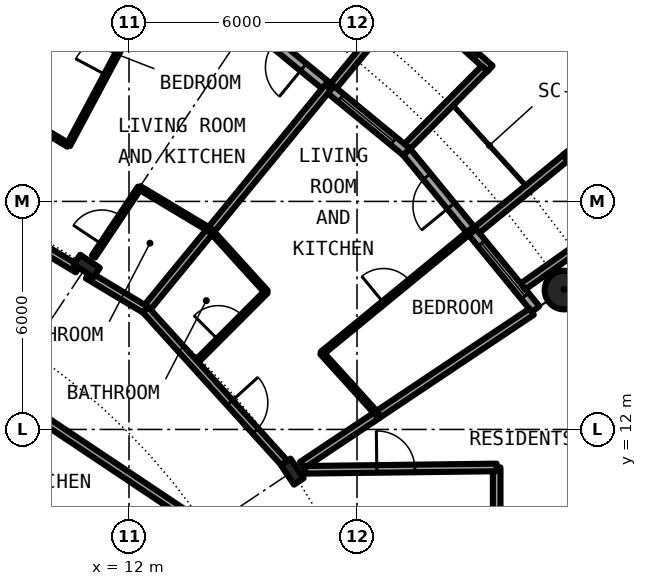
"""IFC4 building model, lengths in metres.
Left out: names, types, materials, properties, quantities, classifications, styles, units other than length and angle.
Written with IfcOpenShell. Run it as: python <this file> out.ifc"""

import sys

from ifc_helpers import new_model, si_unit, direction, frame, frame_2d, origin, origin_2d, place, context, subcontext, project, spatial, rectangle, circle, hollow_circle, i_section, extrude, element, fill, save


model = new_model("IFC4")
c1 = context("Model", 3, precision=1e-05, world=origin(), true_north=direction((0.0, 1.0)))
c2 = subcontext(c1, "Body", "Model", "MODEL_VIEW")
j1 = project(units=[si_unit("LENGTHUNIT", "METRE"), si_unit("PLANEANGLEUNIT", "RADIAN")], contexts=[c1])
p1 = place(None, origin())
s1 = spatial("IfcSite", under=j1, at=p1, CompositionType="ELEMENT")
p2 = place(p1, origin())
s2 = spatial("IfcBuilding", under=s1, at=p2, CompositionType="ELEMENT")
p3 = place(p2, frame((0.0, 0.0, 28.9)))
s3 = spatial("IfcBuildingStorey", under=s2, at=p3, CompositionType="ELEMENT", Elevation=28.9)
p4 = place(p3, frame((23.448, 15.667, 0.0), z_axis=(0.0, 0.0, 1.0), x_axis=(1.0, 0.0, 0.0)))
e1 = element("IfcColumn", 1, at=p4, inside=s3, PredefinedType="COLUMN", context=c2, shape_type="SweptSolid", body=[
    extrude(hollow_circle(Radius=0.508, WallThickness=0.05, at=origin_2d()), origin(), (0.0, 0.0, 1.0), 3.05),
])
for number, where, z_axis, x_axis in (
    (2, (16.297, 10.889, 0.0), (0.0, 0.0, 1.0), (0.831, 0.556, 0.0)),
    (3, (10.889, 16.297, 0.0), (0.0, 0.0, 1.0), (0.556, 0.831, 0.0)),
):
    element("IfcColumn", number, at=place(p3, frame(where, z_axis=z_axis, x_axis=x_axis)), inside=s3, PredefinedType="COLUMN", context=c2, shape_type="SweptSolid", body=[
        extrude(i_section(OverallWidth=0.305, OverallDepth=0.62, WebThickness=0.021, FlangeThickness=0.04, FilletRadius=0.027, at=origin_2d()), origin(), (0.0, 0.0, 1.0), 3.05),
    ])
p5 = place(p3, frame((22.699, 15.167, 0.0), z_axis=(0.0, 0.0, 1.0), x_axis=(-0.634382322723, 0.773019449054, 0.0)))
e4 = element("IfcWall", 4, at=p5, inside=s3, PredefinedType="SOLIDWALL", context=c2, shape_type="SweptSolid", body=[
    extrude(rectangle(XDim=5.352, YDim=0.25, at=frame_2d((2.676, 0.0))), origin(), (0.0, 0.0, 1.0), 2.7),
])
p6 = place(p5, frame((0.441, 0.0, 0.3)))
e5 = element("IfcOpeningElement", 5, at=p6, cuts=e4, PredefinedType="OPENING", context=c2, shape_type="SweptSolid", body=[
    extrude(rectangle(XDim=1.8, YDim=2.1, at=frame_2d((0.9, 1.05))), frame((0.0, 0.135, 0.0), z_axis=(0.0, -1.0, 0.0), x_axis=(1.0, 0.0, 0.0)), (0.0, 0.0, 1.0), 0.27),
])
p7 = place(p5, frame((3.51, 0.0, 0.0)))
e6 = element("IfcOpeningElement", 6, at=p7, cuts=e4, PredefinedType="OPENING", context=c2, shape_type="SweptSolid", body=[
    extrude(rectangle(XDim=1.0, YDim=2.2, at=frame_2d((0.5, 1.1))), frame((0.0, 0.135, 0.0), z_axis=(0.0, -1.0, 0.0), x_axis=(1.0, 0.0, 0.0)), (0.0, 0.0, 1.0), 0.27),
])
p8 = place(p3, frame((24.909, 17.427, -0.03), z_axis=(0.0, 0.0, 1.0), x_axis=(-0.60418752353, 0.796842165306, 0.0)))
e7 = element("IfcWall", 7, at=p8, inside=s3, PredefinedType="SOLIDWALL", context=c2, shape_type="SweptSolid", body=[
    extrude(rectangle(XDim=2.337, YDim=0.2, at=frame_2d((1.168, 0.0))), origin(), (0.0, 0.0, 1.0), 2.73),
])
p9 = place(p8, frame((0.128, 0.0, 0.33)))
e8 = element("IfcOpeningElement", 8, at=p9, cuts=e7, PredefinedType="OPENING", context=c2, shape_type="SweptSolid", body=[
    extrude(circle(Radius=1.04, at=frame_2d((1.04, 1.04))), frame((0.0, 0.11, 0.0), z_axis=(0.0, -1.0, 0.0), x_axis=(1.0, 0.0, 0.0)), (0.0, 0.0, 1.0), 0.22),
])
p10 = place(p3, frame((22.37, 15.765, -0.03), z_axis=(0.0, 0.0, 1.0), x_axis=(0.817256123454, 0.576274612209, 0.0)))
e9 = element("IfcWall", 9, at=p10, inside=s3, PredefinedType="SOLIDWALL", context=c2, shape_type="SweptSolid", body=[
    extrude(rectangle(XDim=2.933, YDim=0.2, at=frame_2d((1.466, 0.0))), origin(), (0.0, 0.0, 1.0), 2.73),
])
p11 = place(p3, frame((21.155, 17.246, -0.03), z_axis=(0.0, 0.0, 1.0), x_axis=(0.775179004516, 0.631741648902, 0.0)))
e10 = element("IfcWall", 10, at=p11, inside=s3, PredefinedType="SOLIDWALL", context=c2, shape_type="SweptSolid", body=[
    extrude(rectangle(XDim=3.006, YDim=0.2, at=frame_2d((1.503, 0.0))), origin(), (0.0, 0.0, 1.0), 2.73),
])
p12 = place(p3, frame((19.304, 19.304, 0.0), z_axis=(0.0, 0.0, 1.0), x_axis=(-0.773019449054, 0.634382322723, 0.0)))
e11 = element("IfcWall", 11, at=p12, inside=s3, PredefinedType="SOLIDWALL", context=c2, shape_type="SweptSolid", body=[
    extrude(rectangle(XDim=5.352, YDim=0.25, at=frame_2d((2.676, 0.0))), origin(), (0.0, 0.0, 1.0), 2.7),
])
p13 = place(p12, frame((0.441, 0.0, 0.3)))
e12 = element("IfcOpeningElement", 12, at=p13, cuts=e11, PredefinedType="OPENING", context=c2, shape_type="SweptSolid", body=[
    extrude(rectangle(XDim=1.8, YDim=2.1, at=frame_2d((0.9, 1.05))), frame((0.0, 0.135, 0.0), z_axis=(0.0, -1.0, 0.0), x_axis=(1.0, 0.0, 0.0)), (0.0, 0.0, 1.0), 0.27),
])
p14 = place(p12, frame((3.51, 0.0, 0.0)))
e13 = element("IfcOpeningElement", 13, at=p14, cuts=e11, PredefinedType="OPENING", context=c2, shape_type="SweptSolid", body=[
    extrude(rectangle(XDim=1.0, YDim=2.2, at=frame_2d((0.5, 1.1))), frame((0.0, 0.135, 0.0), z_axis=(0.0, -1.0, 0.0), x_axis=(1.0, 0.0, 0.0)), (0.0, 0.0, 1.0), 0.27),
])
p15 = place(p3, frame((21.5, 21.493, -0.03), z_axis=(0.0, 0.0, 1.0), x_axis=(-0.740998365753, 0.671506829416, 0.0)))
e14 = element("IfcWall", 14, at=p15, inside=s3, PredefinedType="SOLIDWALL", context=c2, shape_type="SweptSolid", body=[
    extrude(rectangle(XDim=2.993, YDim=0.2, at=frame_2d((1.497, 0.0))), origin(), (0.0, 0.0, 1.0), 2.73),
])
p16 = place(p15, frame((0.457, 0.0, 0.33)))
e15 = element("IfcOpeningElement", 15, at=p16, cuts=e14, PredefinedType="OPENING", context=c2, shape_type="SweptSolid", body=[
    extrude(circle(Radius=1.04, at=frame_2d((1.04, 1.04))), frame((0.0, 0.11, 0.0), z_axis=(0.0, -1.0, 0.0), x_axis=(1.0, 0.0, 0.0)), (0.0, 0.0, 1.0), 0.22),
])
p17 = place(p3, frame((19.323, 19.45, -0.03), z_axis=(0.0, 0.0, 1.0), x_axis=(0.704476739375, 0.709727076896, 0.0)))
e16 = element("IfcWall", 16, at=p17, inside=s3, PredefinedType="SOLIDWALL", context=c2, shape_type="SweptSolid", body=[
    extrude(rectangle(XDim=2.883, YDim=0.2, at=frame_2d((1.441, 0.0))), origin(), (0.0, 0.0, 1.0), 2.73),
])
p18 = place(p3, frame((17.384, 21.041, -0.03), z_axis=(0.0, 0.0, 1.0), x_axis=(0.63709551667, 0.770784861449, 0.0)))
e17 = element("IfcWall", 17, at=p18, inside=s3, PredefinedType="SOLIDWALL", context=c2, shape_type="SweptSolid", body=[
    extrude(rectangle(XDim=3.006, YDim=0.2, at=frame_2d((1.503, 0.0))), origin(), (0.0, 0.0, 1.0), 2.73),
])
p19 = place(p3, frame((21.675, 9.4, 0.0), z_axis=(0.0, 0.0, 1.0), x_axis=(0.0, 1.0, 0.0)))
e18 = element("IfcWall", 18, at=p19, inside=s3, PredefinedType="PARTITIONING", context=c2, shape_type="SweptSolid", body=[
    extrude(rectangle(XDim=1.6, YDim=0.2, at=frame_2d((0.8, 0.0))), origin(), (0.0, 0.0, 1.0), 2.7),
])
p20 = place(p3, frame((7.501, 18.108, 0.0), z_axis=(0.0, 0.0, 1.0), x_axis=(0.382490346157, 0.923959487801, 0.0)))
e19 = element("IfcWall", 19, at=p20, inside=s3, PredefinedType="PARTITIONING", context=c2, shape_type="SweptSolid", body=[
    extrude(rectangle(XDim=7.574, YDim=0.2, at=frame_2d((3.787, 0.0))), origin(), (0.0, 0.0, 1.0), 2.7),
])
p21 = place(p3, frame((10.405, 19.481, 0.0), z_axis=(0.0, 0.0, 1.0), x_axis=(0.471170755767, 0.882042016522, 0.0)))
e20 = element("IfcWall", 20, at=p21, inside=s3, PredefinedType="PARTITIONING", context=c2, shape_type="SweptSolid", body=[
    extrude(rectangle(XDim=5.089, YDim=0.1, at=frame_2d((2.545, 0.0))), origin(), (0.0, 0.0, 1.0), 2.7),
])
p22 = place(p21, frame((2.095, 0.0, 0.0)))
e21 = element("IfcOpeningElement", 21, at=p22, cuts=e20, PredefinedType="OPENING", context=c2, shape_type="SweptSolid", body=[
    extrude(rectangle(XDim=0.9, YDim=2.3, at=frame_2d((0.45, 1.15))), frame((0.0, 0.06, 0.0), z_axis=(0.0, -1.0, 0.0), x_axis=(1.0, 0.0, 0.0)), (0.0, 0.0, 1.0), 0.12),
])
p23 = place(p3, frame((11.067, 16.551, 0.0), z_axis=(0.0, 0.0, 1.0), x_axis=(0.55563200073, 0.831428337119, 0.0)))
e22 = element("IfcWall", 22, at=p23, inside=s3, PredefinedType="PARTITIONING", context=c2, shape_type="SweptSolid", body=[
    extrude(rectangle(XDim=2.176, YDim=0.1, at=frame_2d((1.088, 0.0))), origin(), (0.0, 0.0, 1.0), 2.7),
])
p24 = place(p23, frame((0.389, 0.0, 0.0)))
e23 = element("IfcOpeningElement", 23, at=p24, cuts=e22, PredefinedType="OPENING", context=c2, shape_type="SweptSolid", body=[
    extrude(rectangle(XDim=0.9, YDim=2.3, at=frame_2d((0.45, 1.15))), frame((0.0, 0.06, 0.0), z_axis=(0.0, -1.0, 0.0), x_axis=(1.0, 0.0, 0.0)), (0.0, 0.0, 1.0), 0.12),
])
p25 = place(p3, frame((12.434, 15.151, 0.0), z_axis=(0.0, 0.0, 1.0), x_axis=(0.634381303318, 0.773020285633, 0.0)))
e24 = element("IfcWall", 24, at=p25, inside=s3, PredefinedType="PARTITIONING", context=c2, shape_type="SweptSolid", body=[
    extrude(rectangle(XDim=7.576, YDim=0.2, at=frame_2d((3.788, 0.0))), origin(), (0.0, 0.0, 1.0), 2.7),
])
p26 = place(p3, frame((13.722, 13.73, 0.0), z_axis=(0.0, 0.0, 1.0), x_axis=(0.706741540154, 0.707471833659, 0.0)))
e25 = element("IfcWall", 25, at=p26, inside=s3, PredefinedType="PARTITIONING", context=c2, shape_type="SweptSolid", body=[
    extrude(rectangle(XDim=2.674, YDim=0.1, at=frame_2d((1.337, 0.0))), origin(), (0.0, 0.0, 1.0), 2.7),
])
p27 = place(p26, frame((0.887, 0.0, 0.0)))
e26 = element("IfcOpeningElement", 26, at=p27, cuts=e25, PredefinedType="OPENING", context=c2, shape_type="SweptSolid", body=[
    extrude(rectangle(XDim=0.9, YDim=2.3, at=frame_2d((0.45, 1.15))), frame((0.0, 0.06, 0.0), z_axis=(0.0, -1.0, 0.0), x_axis=(1.0, 0.0, 0.0)), (0.0, 0.0, 1.0), 0.12),
])
p28 = place(p3, frame((17.077, 14.006, 0.0), z_axis=(0.0, 0.0, 1.0), x_axis=(0.77326214499, 0.634086472908, 0.0)))
e27 = element("IfcWall", 27, at=p28, inside=s3, PredefinedType="PARTITIONING", context=c2, shape_type="SweptSolid", body=[
    extrude(rectangle(XDim=5.089, YDim=0.1, at=frame_2d((2.544, 0.0))), origin(), (0.0, 0.0, 1.0), 2.7),
])
p29 = place(p28, frame((2.094, 0.0, 0.0)))
e28 = element("IfcOpeningElement", 28, at=p29, cuts=e27, PredefinedType="OPENING", context=c2, shape_type="SweptSolid", body=[
    extrude(rectangle(XDim=0.9, YDim=2.3, at=frame_2d((0.45, 1.15))), frame((0.0, 0.06, 0.0), z_axis=(0.0, -1.0, 0.0), x_axis=(1.0, 0.0, 0.0)), (0.0, 0.0, 1.0), 0.12),
])
p30 = place(p3, frame((18.542, 12.389, 0.0), z_axis=(0.0, 0.0, 1.0), x_axis=(0.831387096605, 0.55569370664, 0.0)))
e29 = element("IfcWall", 29, at=p30, inside=s3, PredefinedType="PARTITIONING", context=c2, shape_type="SweptSolid", body=[
    extrude(rectangle(XDim=4.875, YDim=0.2, at=frame_2d((2.438, 0.0))), origin(), (0.0, 0.0, 1.0), 2.7),
])
p31 = place(p3, frame((16.555, 11.061, 0.0), z_axis=(0.0, 0.0, 1.0), x_axis=(0.832066006555, 0.554676627176, 0.0)))
e30 = element("IfcWall", 30, at=p31, inside=s3, PredefinedType="PARTITIONING", context=c2, shape_type="SweptSolid", body=[
    extrude(rectangle(XDim=2.39, YDim=0.2, at=frame_2d((1.195, 0.0))), origin(), (0.0, 0.0, 1.0), 2.7),
])
p32 = place(p3, frame((16.637, 10.938, 0.0), z_axis=(0.0, 0.0, 1.0), x_axis=(0.99992425795, 0.012307654658, 0.0)))
e31 = element("IfcWall", 31, at=p32, inside=s3, PredefinedType="PARTITIONING", context=c2, shape_type="SweptSolid", body=[
    extrude(rectangle(XDim=5.039, YDim=0.2, at=frame_2d((2.519, 0.0))), origin(), (0.0, 0.0, 1.0), 2.7),
])
p33 = place(p32, frame((1.884, 0.0, 0.0)))
e32 = element("IfcOpeningElement", 32, at=p33, cuts=e31, PredefinedType="OPENING", context=c2, shape_type="SweptSolid", body=[
    extrude(rectangle(XDim=1.0, YDim=2.3, at=frame_2d((0.5, 1.15))), frame((0.0, 0.11, 0.0), z_axis=(0.0, -1.0, 0.0), x_axis=(1.0, 0.0, 0.0)), (0.0, 0.0, 1.0), 0.22),
])
p34 = place(p3, frame((3.299, 16.574, 0.0), z_axis=(0.0, 0.0, 1.0), x_axis=(0.831465254975, -0.555576754166, 0.0)))
e33 = element("IfcWall", 33, at=p34, inside=s3, PredefinedType="PARTITIONING", context=c2, shape_type="SweptSolid", body=[
    extrude(rectangle(XDim=12.915, YDim=0.2, at=frame_2d((6.457, 0.0))), origin(), (0.0, 0.0, 1.0), 2.7),
])
p35 = place(p34, frame((4.346, 0.0, 0.0)))
e34 = element("IfcOpeningElement", 34, at=p35, cuts=e33, PredefinedType="OPENING", context=c2, shape_type="SweptSolid", body=[
    extrude(rectangle(XDim=1.0, YDim=2.3, at=frame_2d((0.5, 1.15))), frame((0.0, 0.11, 0.0), z_axis=(0.0, -1.0, 0.0), x_axis=(1.0, 0.0, 0.0)), (0.0, 0.0, 1.0), 0.22),
])
p36 = place(p3, frame((7.501, 18.108, 0.0), z_axis=(0.0, 0.0, 1.0), x_axis=(0.857656999296, -0.514222200569, 0.0)))
e35 = element("IfcWall", 35, at=p36, inside=s3, PredefinedType="PARTITIONING", context=c2, shape_type="SweptSolid", body=[
    extrude(rectangle(XDim=3.675, YDim=0.2, at=frame_2d((1.838, 0.0))), origin(), (0.0, 0.0, 1.0), 2.38),
])
p37 = place(p36, frame((1.418, 0.0, 0.0)))
e36 = element("IfcOpeningElement", 36, at=p37, cuts=e35, PredefinedType="OPENING", context=c2, shape_type="SweptSolid", body=[
    extrude(rectangle(XDim=1.0, YDim=2.3, at=frame_2d((0.5, 1.15))), frame((0.0, 0.11, 0.0), z_axis=(0.0, -1.0, 0.0), x_axis=(1.0, 0.0, 0.0)), (0.0, 0.0, 1.0), 0.22),
])
p38 = place(p3, frame((10.915, 16.061, 0.0), z_axis=(0.0, 0.0, 1.0), x_axis=(0.857809047014, -0.513968519329, 0.0)))
e37 = element("IfcWall", 37, at=p38, inside=s3, PredefinedType="PARTITIONING", context=c2, shape_type="SweptSolid", body=[
    extrude(rectangle(XDim=1.771, YDim=0.2, at=frame_2d((0.885, 0.0))), origin(), (0.0, 0.0, 1.0), 2.38),
])
p39 = place(p3, frame((12.434, 15.151, 0.0), z_axis=(0.0, 0.0, 1.0), x_axis=(0.671514934772, -0.740991020444, 0.0)))
e38 = element("IfcWall", 38, at=p39, inside=s3, PredefinedType="PARTITIONING", context=c2, shape_type="SweptSolid", body=[
    extrude(rectangle(XDim=5.598, YDim=0.2, at=frame_2d((2.799, 0.0))), origin(), (0.0, 0.0, 1.0), 2.38),
])
p40 = place(p39, frame((3.305, 0.0, 0.0)))
e39 = element("IfcOpeningElement", 39, at=p40, cuts=e38, PredefinedType="OPENING", context=c2, shape_type="SweptSolid", body=[
    extrude(rectangle(XDim=1.0, YDim=2.3, at=frame_2d((0.5, 1.15))), frame((0.0, 0.11, 0.0), z_axis=(0.0, -1.0, 0.0), x_axis=(1.0, 0.0, 0.0)), (0.0, 0.0, 1.0), 0.22),
])
for number, where, z_axis, x_axis in (
    (40, (8.534, 20.603, 0.0), (0.0, 0.0, 1.0), (0.858, -0.514, 0.0)),
    (41, (12.276, 18.359, 0.0), (0.0, 0.0, 1.0), (0.858, -0.514, 0.0)),
):
    element("IfcWall", number, at=place(p3, frame(where, z_axis=z_axis, x_axis=x_axis)), inside=s3, PredefinedType="PARTITIONING", context=c2, shape_type="SweptSolid", body=[
        extrude(rectangle(XDim=2.182, YDim=0.1, at=frame_2d((1.091, 0.0))), origin(), (0.0, 0.0, 1.0), 2.7),
    ])
p41 = place(p3, frame((14.147, 17.238, 0.0), z_axis=(0.0, 0.0, 1.0), x_axis=(0.671674967707, -0.740845960882, 0.0)))
e42 = element("IfcWall", 42, at=p41, inside=s3, PredefinedType="PARTITIONING", context=c2, shape_type="SweptSolid", body=[
    extrude(rectangle(XDim=2.181, YDim=0.1, at=frame_2d((1.091, 0.0))), origin(), (0.0, 0.0, 1.0), 2.7),
])
p42 = place(p3, frame((17.072, 14.011, 0.0), z_axis=(0.0, 0.0, 1.0), x_axis=(0.67169789574, -0.740825172937, 0.0)))
e43 = element("IfcWall", 43, at=p42, inside=s3, PredefinedType="PARTITIONING", context=c2, shape_type="SweptSolid", body=[
    extrude(rectangle(XDim=2.183, YDim=0.1, at=frame_2d((1.091, 0.0))), origin(), (0.0, 0.0, 1.0), 2.7),
])
p43 = place(p6, origin())
e44 = element("IfcWindow", 44, at=p43, inside=s3, PartitioningType="SINGLE_PANEL", PredefinedType="WINDOW", context=c2, shape_type="SweptSolid", body=[
    extrude(rectangle(XDim=1.8, YDim=2.1, at=frame_2d((0.9, 1.05))), frame((0.0, 0.03, 0.0), z_axis=(0.0, -1.0, 0.0), x_axis=(1.0, 0.0, 0.0)), (0.0, 0.0, 1.0), 0.06),
])
fill(e5, e44)
p44 = place(p7, origin())
e45 = element("IfcDoor", 45, at=p44, inside=s3, OperationType="SINGLE_SWING_LEFT", PredefinedType="DOOR", context=c2, shape_type="SweptSolid", body=[
    extrude(rectangle(XDim=1.0, YDim=2.2, at=frame_2d((0.5, 1.1))), frame((0.0, 0.025, 0.0), z_axis=(0.0, -1.0, 0.0), x_axis=(1.0, 0.0, 0.0)), (0.0, 0.0, 1.0), 0.05),
])
fill(e6, e45)
p45 = place(p13, origin())
e46 = element("IfcWindow", 46, at=p45, inside=s3, PartitioningType="SINGLE_PANEL", PredefinedType="WINDOW", context=c2, shape_type="SweptSolid", body=[
    extrude(rectangle(XDim=1.8, YDim=2.1, at=frame_2d((0.9, 1.05))), frame((0.0, 0.03, 0.0), z_axis=(0.0, -1.0, 0.0), x_axis=(1.0, 0.0, 0.0)), (0.0, 0.0, 1.0), 0.06),
])
fill(e12, e46)
p46 = place(p16, origin())
e47 = element("IfcWindow", 47, at=p46, inside=s3, PartitioningType="SINGLE_PANEL", PredefinedType="WINDOW", context=c2, shape_type="SweptSolid", body=[
    extrude(circle(Radius=1.04, at=frame_2d((1.04, 1.04))), frame((0.0, 0.03, 0.0), z_axis=(0.0, -1.0, 0.0), x_axis=(1.0, 0.0, 0.0)), (0.0, 0.0, 1.0), 0.06),
])
fill(e15, e47)
p47 = place(p14, origin())
e48 = element("IfcDoor", 48, at=p47, inside=s3, OperationType="SINGLE_SWING_LEFT", PredefinedType="DOOR", context=c2, shape_type="SweptSolid", body=[
    extrude(rectangle(XDim=1.0, YDim=2.2, at=frame_2d((0.5, 1.1))), frame((0.0, 0.025, 0.0), z_axis=(0.0, -1.0, 0.0), x_axis=(1.0, 0.0, 0.0)), (0.0, 0.0, 1.0), 0.05),
])
fill(e13, e48)
p48 = place(p40, origin())
e49 = element("IfcDoor", 49, at=p48, inside=s3, OperationType="SINGLE_SWING_RIGHT", PredefinedType="DOOR", context=c2, shape_type="SweptSolid", body=[
    extrude(rectangle(XDim=1.0, YDim=2.3, at=frame_2d((0.5, 1.15))), frame((0.0, 0.025, 0.0), z_axis=(0.0, -1.0, 0.0), x_axis=(1.0, 0.0, 0.0)), (0.0, 0.0, 1.0), 0.05),
])
fill(e39, e49)
p49 = place(p27, origin())
e50 = element("IfcDoor", 50, at=p49, inside=s3, OperationType="SINGLE_SWING_RIGHT", PredefinedType="DOOR", context=c2, shape_type="SweptSolid", body=[
    extrude(rectangle(XDim=0.9, YDim=2.3, at=frame_2d((0.45, 1.15))), frame((0.0, 0.025, 0.0), z_axis=(0.0, -1.0, 0.0), x_axis=(1.0, 0.0, 0.0)), (0.0, 0.0, 1.0), 0.05),
])
fill(e26, e50)
p50 = place(p29, origin())
e51 = element("IfcDoor", 51, at=p50, inside=s3, OperationType="SINGLE_SWING_RIGHT", PredefinedType="DOOR", context=c2, shape_type="SweptSolid", body=[
    extrude(rectangle(XDim=0.9, YDim=2.3, at=frame_2d((0.45, 1.15))), frame((0.0, 0.025, 0.0), z_axis=(0.0, -1.0, 0.0), x_axis=(1.0, 0.0, 0.0)), (0.0, 0.0, 1.0), 0.05),
])
fill(e28, e51)
p51 = place(p24, origin())
e52 = element("IfcDoor", 52, at=p51, inside=s3, OperationType="SINGLE_SWING_LEFT", PredefinedType="DOOR", context=c2, shape_type="SweptSolid", body=[
    extrude(rectangle(XDim=0.9, YDim=2.3, at=frame_2d((0.45, 1.15))), frame((0.0, 0.025, 0.0), z_axis=(0.0, -1.0, 0.0), x_axis=(1.0, 0.0, 0.0)), (0.0, 0.0, 1.0), 0.05),
])
fill(e23, e52)
p52 = place(p22, origin())
e53 = element("IfcDoor", 53, at=p52, inside=s3, OperationType="SINGLE_SWING_RIGHT", PredefinedType="DOOR", context=c2, shape_type="SweptSolid", body=[
    extrude(rectangle(XDim=0.9, YDim=2.3, at=frame_2d((0.45, 1.15))), frame((0.0, 0.025, 0.0), z_axis=(0.0, -1.0, 0.0), x_axis=(1.0, 0.0, 0.0)), (0.0, 0.0, 1.0), 0.05),
])
fill(e21, e53)
p53 = place(p33, origin())
e54 = element("IfcDoor", 54, at=p53, inside=s3, OperationType="SINGLE_SWING_LEFT", PredefinedType="DOOR", context=c2, shape_type="SweptSolid", body=[
    extrude(rectangle(XDim=1.0, YDim=2.3, at=frame_2d((0.5, 1.15))), frame((0.0, 0.025, 0.0), z_axis=(0.0, -1.0, 0.0), x_axis=(1.0, 0.0, 0.0)), (0.0, 0.0, 1.0), 0.05),
])
fill(e32, e54)
save(model, sys.argv[1])
